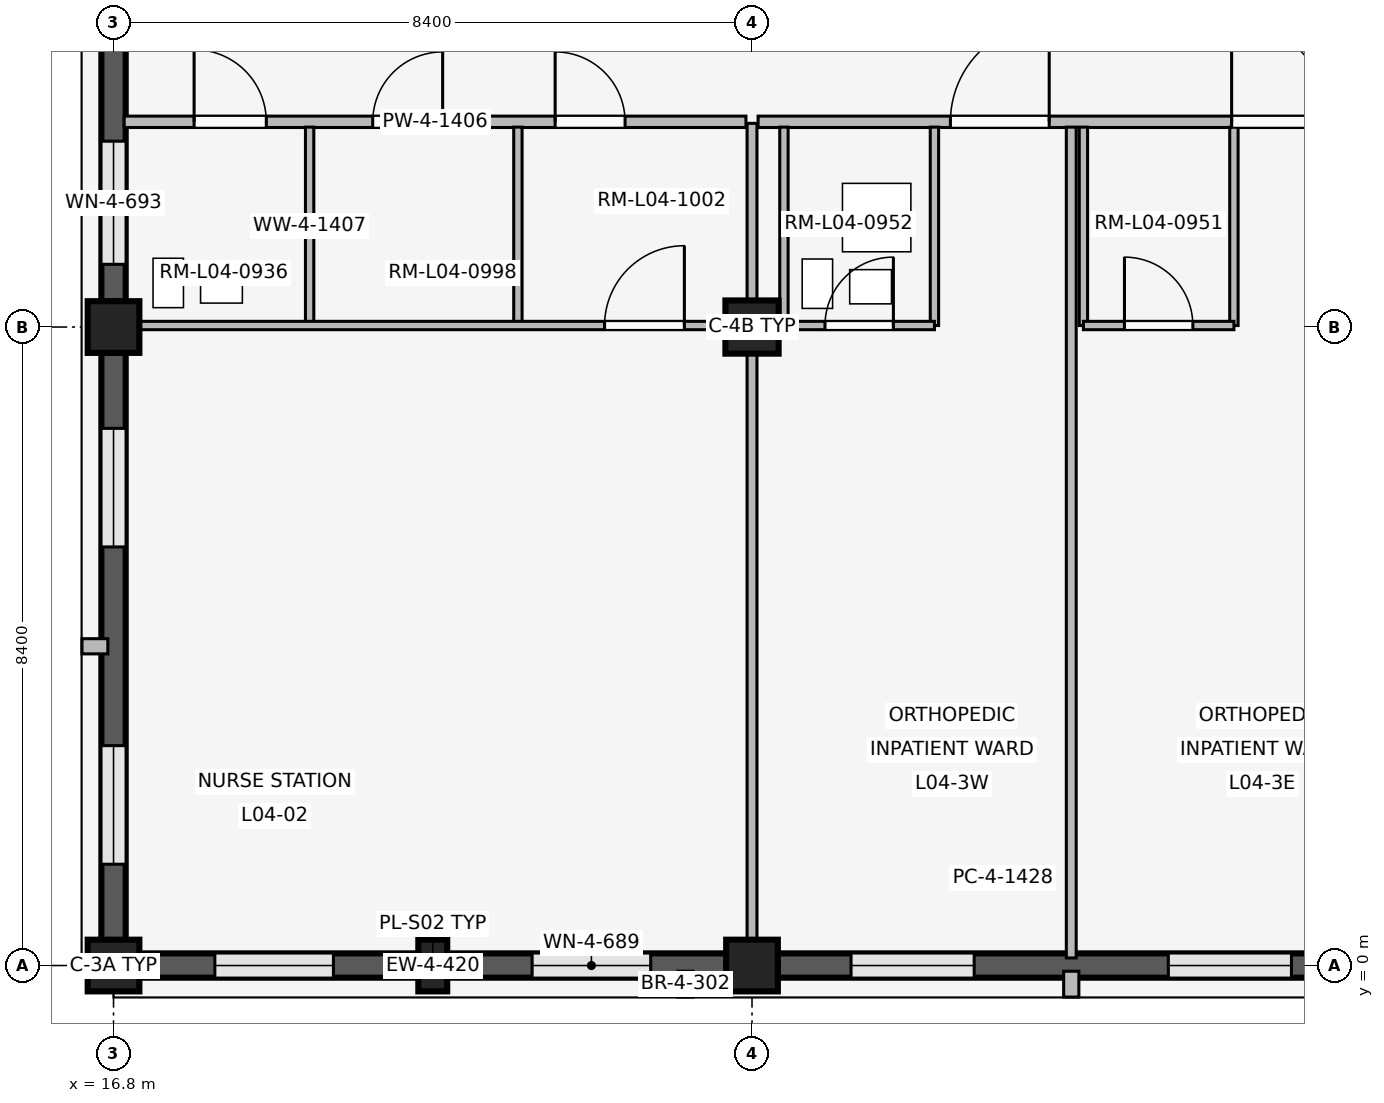
"""IFC4 building model, lengths in metres.
Left out: names, types, materials, properties, quantities, classifications, styles, units other than length and angle.
Written with IfcOpenShell. Run it as: python <this file> out.ifc"""

import sys

from ifc_helpers import new_model, si_unit, direction, frame, frame_2d, origin, origin_2d, place, context, subcontext, project, spatial, rectangle, extrude, element, fill, save


model = new_model("IFC4")
c1 = context("Model", 3, precision=1e-05, world=origin(), true_north=direction((0.0, 1.0)))
c2 = subcontext(c1, "Body", "Model", "MODEL_VIEW")
j1 = project(units=[si_unit("LENGTHUNIT", "METRE"), si_unit("PLANEANGLEUNIT", "RADIAN")], contexts=[c1])
p1 = place(None, origin())
s1 = spatial("IfcSite", under=j1, at=p1, CompositionType="ELEMENT")
p2 = place(p1, origin())
s2 = spatial("IfcBuilding", under=s1, at=p2, CompositionType="ELEMENT")
p3 = place(p2, frame((0.0, 0.0, 16.2)))
s3 = spatial("IfcBuildingStorey", under=s2, at=p3, CompositionType="ELEMENT", Elevation=16.2)
for number, where, z_axis, x_axis in (
    (1, (16.8, 0.0, 0.0), (0.0, 0.0, 1.0), (1.0, 0.0, 0.0)),
    (2, (16.8, 8.4, 0.0), (0.0, 0.0, 1.0), (1.0, 0.0, 0.0)),
    (3, (25.2, 0.0, 0.0), (0.0, 0.0, 1.0), (1.0, 0.0, 0.0)),
):
    element("IfcColumn", number, at=place(p3, frame(where, z_axis=z_axis, x_axis=x_axis)), inside=s3, PredefinedType="COLUMN", context=c2, shape_type="SweptSolid", body=[
        extrude(rectangle(XDim=0.68, YDim=0.68, at=origin_2d()), origin(), (0.0, 0.0, 1.0), 4.2),
    ])
p4 = place(p3, frame((25.2, 8.4, 0.0), z_axis=(0.0, 0.0, 1.0), x_axis=(1.0, 0.0, 0.0)))
e4 = element("IfcColumn", 4, at=p4, inside=s3, PredefinedType="COLUMN", context=c2, shape_type="SweptSolid", body=[
    extrude(rectangle(XDim=0.7, YDim=0.7, at=origin_2d()), origin(), (0.0, 0.0, 1.0), 4.2),
])
p5 = place(p3, frame((21.0, 0.0, 0.0), z_axis=(0.0, 0.0, 1.0), x_axis=(1.0, 0.0, 0.0)))
e5 = element("IfcColumn", 5, at=p5, inside=s3, PredefinedType="PILASTER", context=c2, shape_type="SweptSolid", body=[
    extrude(rectangle(XDim=0.38, YDim=0.68, at=origin_2d()), origin(), (0.0, 0.0, 1.0), 4.2),
])
p6 = place(p3, frame((24.865, 0.0, 0.0), z_axis=(0.0, 0.0, 1.0), x_axis=(-1.0, 0.0, 0.0)))
e6 = element("IfcWall", 6, at=p6, inside=s3, PredefinedType="SOLIDWALL", context=c2, shape_type="SweptSolid", body=[
    extrude(rectangle(XDim=7.73, YDim=0.32, at=frame_2d((3.865, 0.0))), origin(), (0.0, 0.0, 1.0), 3.32),
])
p7 = place(p6, frame((0.998, 0.0, 0.85)))
e7 = element("IfcOpeningElement", 7, at=p7, cuts=e6, PredefinedType="OPENING", context=c2, shape_type="SweptSolid", body=[
    extrude(rectangle(XDim=1.56, YDim=1.7, at=frame_2d((0.78, 0.85))), frame((0.0, 0.17, 0.0), z_axis=(0.0, -1.0, 0.0), x_axis=(1.0, 0.0, 0.0)), (0.0, 0.0, 1.0), 0.34),
])
p8 = place(p6, frame((5.172, 0.0, 0.85)))
e8 = element("IfcOpeningElement", 8, at=p8, cuts=e6, PredefinedType="OPENING", context=c2, shape_type="SweptSolid", body=[
    extrude(rectangle(XDim=1.56, YDim=1.7, at=frame_2d((0.78, 0.85))), frame((0.0, 0.17, 0.0), z_axis=(0.0, -1.0, 0.0), x_axis=(1.0, 0.0, 0.0)), (0.0, 0.0, 1.0), 0.34),
])
p9 = place(p3, frame((24.324, -0.075, 0.0), z_axis=(0.0, 0.0, 1.0), x_axis=(0.0, -1.0, 0.0)))
e9 = element("IfcWall", 9, at=p9, inside=s3, PredefinedType="ELEMENTEDWALL", context=c2, shape_type="SweptSolid", body=[
    extrude(rectangle(XDim=0.34, YDim=0.2, at=frame_2d((0.17, 0.0))), origin(), (0.0, 0.0, 1.0), 3.3),
])
p10 = place(p3, frame((16.8, 0.335, 0.0), z_axis=(0.0, 0.0, 1.0), x_axis=(0.0, 1.0, 0.0)))
e10 = element("IfcWall", 10, at=p10, inside=s3, PredefinedType="SOLIDWALL", context=c2, shape_type="SweptSolid", body=[
    extrude(rectangle(XDim=7.73, YDim=0.32, at=frame_2d((3.865, 0.0))), origin(), (0.0, 0.0, 1.0), 3.32),
])
p11 = place(p10, frame((0.998, 0.0, 0.85)))
e11 = element("IfcOpeningElement", 11, at=p11, cuts=e10, PredefinedType="OPENING", context=c2, shape_type="SweptSolid", body=[
    extrude(rectangle(XDim=1.56, YDim=1.7, at=frame_2d((0.78, 0.85))), frame((0.0, 0.17, 0.0), z_axis=(0.0, -1.0, 0.0), x_axis=(1.0, 0.0, 0.0)), (0.0, 0.0, 1.0), 0.34),
])
p12 = place(p10, frame((5.172, 0.0, 0.85)))
e12 = element("IfcOpeningElement", 12, at=p12, cuts=e10, PredefinedType="OPENING", context=c2, shape_type="SweptSolid", body=[
    extrude(rectangle(XDim=1.56, YDim=1.7, at=frame_2d((0.78, 0.85))), frame((0.0, 0.17, 0.0), z_axis=(0.0, -1.0, 0.0), x_axis=(1.0, 0.0, 0.0)), (0.0, 0.0, 1.0), 0.34),
])
p13 = place(p3, frame((16.725, 4.2, 0.0), z_axis=(0.0, 0.0, 1.0), x_axis=(-1.0, 0.0, 0.0)))
e13 = element("IfcWall", 13, at=p13, inside=s3, PredefinedType="ELEMENTEDWALL", context=c2, shape_type="SweptSolid", body=[
    extrude(rectangle(XDim=0.34, YDim=0.2, at=frame_2d((0.17, 0.0))), origin(), (0.0, 0.0, 1.0), 3.3),
])
p14 = place(p3, frame((16.8, 8.735, 0.0), z_axis=(0.0, 0.0, 1.0), x_axis=(0.0, 1.0, 0.0)))
e14 = element("IfcWall", 14, at=p14, inside=s3, PredefinedType="SOLIDWALL", context=c2, shape_type="SweptSolid", body=[
    extrude(rectangle(XDim=7.73, YDim=0.32, at=frame_2d((3.865, 0.0))), origin(), (0.0, 0.0, 1.0), 3.32),
])
p15 = place(p14, frame((0.49, 0.0, 0.85)))
e15 = element("IfcOpeningElement", 15, at=p15, cuts=e14, PredefinedType="OPENING", context=c2, shape_type="SweptSolid", body=[
    extrude(rectangle(XDim=1.62, YDim=1.8, at=frame_2d((0.81, 0.9))), frame((0.0, 0.17, 0.0), z_axis=(0.0, -1.0, 0.0), x_axis=(1.0, 0.0, 0.0)), (0.0, 0.0, 1.0), 0.34),
])
p16 = place(p14, frame((5.67, 0.0, 0.85)))
e16 = element("IfcOpeningElement", 16, at=p16, cuts=e14, PredefinedType="OPENING", context=c2, shape_type="SweptSolid", body=[
    extrude(rectangle(XDim=1.62, YDim=1.8, at=frame_2d((0.81, 0.9))), frame((0.0, 0.17, 0.0), z_axis=(0.0, -1.0, 0.0), x_axis=(1.0, 0.0, 0.0)), (0.0, 0.0, 1.0), 0.34),
])
p17 = place(p3, frame((33.265, 0.0, 0.0), z_axis=(0.0, 0.0, 1.0), x_axis=(-1.0, 0.0, 0.0)))
e17 = element("IfcWall", 17, at=p17, inside=s3, PredefinedType="SOLIDWALL", context=c2, shape_type="SweptSolid", body=[
    extrude(rectangle(XDim=7.73, YDim=0.32, at=frame_2d((3.865, 0.0))), origin(), (0.0, 0.0, 1.0), 3.32),
])
p18 = place(p17, frame((0.968, 0.0, 0.85)))
e18 = element("IfcOpeningElement", 18, at=p18, cuts=e17, PredefinedType="OPENING", context=c2, shape_type="SweptSolid", body=[
    extrude(rectangle(XDim=1.62, YDim=1.8, at=frame_2d((0.81, 0.9))), frame((0.0, 0.17, 0.0), z_axis=(0.0, -1.0, 0.0), x_axis=(1.0, 0.0, 0.0)), (0.0, 0.0, 1.0), 0.34),
])
p19 = place(p17, frame((5.142, 0.0, 0.85)))
e19 = element("IfcOpeningElement", 19, at=p19, cuts=e17, PredefinedType="OPENING", context=c2, shape_type="SweptSolid", body=[
    extrude(rectangle(XDim=1.62, YDim=1.8, at=frame_2d((0.81, 0.9))), frame((0.0, 0.17, 0.0), z_axis=(0.0, -1.0, 0.0), x_axis=(1.0, 0.0, 0.0)), (0.0, 0.0, 1.0), 0.34),
])
p20 = place(p3, frame((29.4, -0.075, 0.0), z_axis=(0.0, 0.0, 1.0), x_axis=(0.0, -1.0, 0.0)))
e20 = element("IfcWall", 20, at=p20, inside=s3, PredefinedType="ELEMENTEDWALL", context=c2, shape_type="SweptSolid", body=[
    extrude(rectangle(XDim=0.34, YDim=0.2, at=frame_2d((0.17, 0.0))), origin(), (0.0, 0.0, 1.0), 3.3),
])
p21 = place(p3, frame((16.94, 11.1, 0.0), z_axis=(0.0, 0.0, 1.0), x_axis=(1.0, 0.0, 0.0)))
e21 = element("IfcWall", 21, at=p21, inside=s3, PredefinedType="PARTITIONING", context=c2, shape_type="SweptSolid", body=[
    extrude(rectangle(XDim=8.18, YDim=0.15, at=frame_2d((4.09, 0.0))), origin(), (0.0, 0.0, 1.0), 3.3),
])
p22 = place(p21, frame((0.92, 0.0, 0.0)))
e22 = element("IfcOpeningElement", 22, at=p22, cuts=e21, PredefinedType="OPENING", context=c2, shape_type="SweptSolid", body=[
    extrude(rectangle(XDim=0.95, YDim=2.15, at=frame_2d((0.475, 1.075))), frame((0.0, 0.085, 0.0), z_axis=(0.0, -1.0, 0.0), x_axis=(1.0, 0.0, 0.0)), (0.0, 0.0, 1.0), 0.17),
])
p23 = place(p21, frame((3.27, 0.0, 0.0)))
e23 = element("IfcOpeningElement", 23, at=p23, cuts=e21, PredefinedType="OPENING", context=c2, shape_type="SweptSolid", body=[
    extrude(rectangle(XDim=0.92, YDim=2.1, at=frame_2d((0.46, 1.05))), frame((0.0, 0.085, 0.0), z_axis=(0.0, -1.0, 0.0), x_axis=(1.0, 0.0, 0.0)), (0.0, 0.0, 1.0), 0.17),
])
p24 = place(p21, frame((5.67, 0.0, 0.0)))
e24 = element("IfcOpeningElement", 24, at=p24, cuts=e21, PredefinedType="OPENING", context=c2, shape_type="SweptSolid", body=[
    extrude(rectangle(XDim=0.92, YDim=2.1, at=frame_2d((0.46, 1.05))), frame((0.0, 0.085, 0.0), z_axis=(0.0, -1.0, 0.0), x_axis=(1.0, 0.0, 0.0)), (0.0, 0.0, 1.0), 0.17),
])
for number, where, z_axis, x_axis in (
    (25, (19.38, 8.44, 0.0), (0.0, 0.0, 1.0), (0.0, 1.0, 0.0)),
    (26, (22.12, 8.44, 0.0), (0.0, 0.0, 1.0), (0.0, 1.0, 0.0)),
):
    element("IfcWall", number, at=place(p3, frame(where, z_axis=z_axis, x_axis=x_axis)), inside=s3, PredefinedType="PARTITIONING", context=c2, shape_type="SweptSolid", body=[
        extrude(rectangle(XDim=2.59, YDim=0.11, at=frame_2d((1.295, 0.0))), origin(), (0.0, 0.0, 1.0), 3.3),
    ])
p25 = place(p3, frame((16.94, 8.42, 0.0), z_axis=(0.0, 0.0, 1.0), x_axis=(1.0, 0.0, 0.0)))
e27 = element("IfcWall", 27, at=p25, inside=s3, PredefinedType="PARTITIONING", context=c2, shape_type="SweptSolid", body=[
    extrude(rectangle(XDim=8.18, YDim=0.11, at=frame_2d((4.09, 0.0))), origin(), (0.0, 0.0, 1.0), 3.3),
])
p26 = place(p25, frame((6.32, 0.0, 0.0)))
e28 = element("IfcOpeningElement", 28, at=p26, cuts=e27, PredefinedType="OPENING", context=c2, shape_type="SweptSolid", body=[
    extrude(rectangle(XDim=1.05, YDim=2.2, at=frame_2d((0.525, 1.1))), frame((0.0, 0.065, 0.0), z_axis=(0.0, -1.0, 0.0), x_axis=(1.0, 0.0, 0.0)), (0.0, 0.0, 1.0), 0.13),
])
p27 = place(p3, frame((25.2, 0.14, 0.0), z_axis=(0.0, 0.0, 1.0), x_axis=(0.0, 1.0, 0.0)))
e29 = element("IfcWall", 29, at=p27, inside=s3, PredefinedType="PARTITIONING", context=c2, shape_type="SweptSolid", body=[
    extrude(rectangle(XDim=10.94, YDim=0.13, at=frame_2d((5.47, 0.0))), origin(), (0.0, 0.0, 1.0), 3.3),
])
p28 = place(p3, frame((25.28, 11.1, 0.0), z_axis=(0.0, 0.0, 1.0), x_axis=(1.0, 0.0, 0.0)))
e30 = element("IfcWall", 30, at=p28, inside=s3, PredefinedType="PARTITIONING", context=c2, shape_type="SweptSolid", body=[
    extrude(rectangle(XDim=8.24, YDim=0.15, at=frame_2d((4.12, 0.0))), origin(), (0.0, 0.0, 1.0), 3.3),
])
p29 = place(p28, frame((2.53, 0.0, 0.0)))
e31 = element("IfcOpeningElement", 31, at=p29, cuts=e30, PredefinedType="OPENING", context=c2, shape_type="SweptSolid", body=[
    extrude(rectangle(XDim=1.3, YDim=2.25, at=frame_2d((0.65, 1.125))), frame((0.0, 0.085, 0.0), z_axis=(0.0, -1.0, 0.0), x_axis=(1.0, 0.0, 0.0)), (0.0, 0.0, 1.0), 0.17),
])
p30 = place(p28, frame((6.23, 0.0, 0.0)))
e32 = element("IfcOpeningElement", 32, at=p30, cuts=e30, PredefinedType="OPENING", context=c2, shape_type="SweptSolid", body=[
    extrude(rectangle(XDim=1.3, YDim=2.25, at=frame_2d((0.65, 1.125))), frame((0.0, 0.085, 0.0), z_axis=(0.0, -1.0, 0.0), x_axis=(1.0, 0.0, 0.0)), (0.0, 0.0, 1.0), 0.17),
])
p31 = place(p3, frame((29.4, 0.1, 0.0), z_axis=(0.0, 0.0, 1.0), x_axis=(0.0, 1.0, 0.0)))
e33 = element("IfcWall", 33, at=p31, inside=s3, PredefinedType="PARTITIONING", context=c2, shape_type="SweptSolid", body=[
    extrude(rectangle(XDim=10.93, YDim=0.13, at=frame_2d((5.465, 0.0))), origin(), (0.0, 0.0, 1.0), 3.3),
])
for number, where, z_axis, x_axis in (
    (34, (25.62, 8.42, 0.0), (0.0, 0.0, 1.0), (0.0, 1.0, 0.0)),
    (35, (27.6, 8.42, 0.0), (0.0, 0.0, 1.0), (0.0, 1.0, 0.0)),
):
    element("IfcWall", number, at=place(p3, frame(where, z_axis=z_axis, x_axis=x_axis)), inside=s3, PredefinedType="PARTITIONING", context=c2, shape_type="SweptSolid", body=[
        extrude(rectangle(XDim=2.61, YDim=0.11, at=frame_2d((1.305, 0.0))), origin(), (0.0, 0.0, 1.0), 3.3),
    ])
p32 = place(p3, frame((25.62, 8.42, 0.0), z_axis=(0.0, 0.0, 1.0), x_axis=(1.0, 0.0, 0.0)))
e36 = element("IfcWall", 36, at=p32, inside=s3, PredefinedType="PARTITIONING", context=c2, shape_type="SweptSolid", body=[
    extrude(rectangle(XDim=1.98, YDim=0.11, at=frame_2d((0.99, 0.0))), origin(), (0.0, 0.0, 1.0), 3.3),
])
p33 = place(p32, frame((0.54, 0.0, 0.0)))
e37 = element("IfcOpeningElement", 37, at=p33, cuts=e36, PredefinedType="OPENING", context=c2, shape_type="SweptSolid", body=[
    extrude(rectangle(XDim=0.9, YDim=2.1, at=frame_2d((0.45, 1.05))), frame((0.0, 0.065, 0.0), z_axis=(0.0, -1.0, 0.0), x_axis=(1.0, 0.0, 0.0)), (0.0, 0.0, 1.0), 0.13),
])
for number, where, z_axis, x_axis in (
    (38, (29.56, 8.42, 0.0), (0.0, 0.0, 1.0), (0.0, 1.0, 0.0)),
    (39, (31.54, 8.42, 0.0), (0.0, 0.0, 1.0), (0.0, 1.0, 0.0)),
):
    element("IfcWall", number, at=place(p3, frame(where, z_axis=z_axis, x_axis=x_axis)), inside=s3, PredefinedType="PARTITIONING", context=c2, shape_type="SweptSolid", body=[
        extrude(rectangle(XDim=2.61, YDim=0.11, at=frame_2d((1.305, 0.0))), origin(), (0.0, 0.0, 1.0), 3.3),
    ])
p34 = place(p3, frame((29.56, 8.42, 0.0), z_axis=(0.0, 0.0, 1.0), x_axis=(1.0, 0.0, 0.0)))
e40 = element("IfcWall", 40, at=p34, inside=s3, PredefinedType="PARTITIONING", context=c2, shape_type="SweptSolid", body=[
    extrude(rectangle(XDim=1.98, YDim=0.11, at=frame_2d((0.99, 0.0))), origin(), (0.0, 0.0, 1.0), 3.3),
])
p35 = place(p34, frame((0.54, 0.0, 0.0)))
e41 = element("IfcOpeningElement", 41, at=p35, cuts=e40, PredefinedType="OPENING", context=c2, shape_type="SweptSolid", body=[
    extrude(rectangle(XDim=0.9, YDim=2.1, at=frame_2d((0.45, 1.05))), frame((0.0, 0.065, 0.0), z_axis=(0.0, -1.0, 0.0), x_axis=(1.0, 0.0, 0.0)), (0.0, 0.0, 1.0), 0.13),
])
p36 = place(p3, frame((28.05, 1.15, 0.0), z_axis=(0.0, 0.0, 1.0), x_axis=(1.0, 0.0, 0.0)))
e42 = element("IfcWall", 42, at=p36, inside=s3, PredefinedType="PLUMBINGWALL", context=c2, shape_type="SweptSolid", body=[
    extrude(rectangle(XDim=0.9, YDim=0.24, at=frame_2d((0.45, 0.0))), origin(), (0.0, 0.0, 1.0), 3.3),
])
p37 = place(p7, origin())
e43 = element("IfcWindow", 43, at=p37, inside=s3, PartitioningType="SINGLE_PANEL", PredefinedType="WINDOW", context=c2, shape_type="SweptSolid", body=[
    extrude(rectangle(XDim=1.56, YDim=1.7, at=frame_2d((0.78, 0.85))), frame((0.0, 0.03, 0.0), z_axis=(0.0, -1.0, 0.0), x_axis=(1.0, 0.0, 0.0)), (0.0, 0.0, 1.0), 0.06),
])
fill(e7, e43)
p38 = place(p8, origin())
e44 = element("IfcWindow", 44, at=p38, inside=s3, PartitioningType="SINGLE_PANEL", PredefinedType="WINDOW", context=c2, shape_type="SweptSolid", body=[
    extrude(rectangle(XDim=1.56, YDim=1.7, at=frame_2d((0.78, 0.85))), frame((0.0, 0.03, 0.0), z_axis=(0.0, -1.0, 0.0), x_axis=(1.0, 0.0, 0.0)), (0.0, 0.0, 1.0), 0.06),
])
fill(e8, e44)
p39 = place(p11, origin())
e45 = element("IfcWindow", 45, at=p39, inside=s3, PartitioningType="SINGLE_PANEL", PredefinedType="WINDOW", context=c2, shape_type="SweptSolid", body=[
    extrude(rectangle(XDim=1.56, YDim=1.7, at=frame_2d((0.78, 0.85))), frame((0.0, 0.03, 0.0), z_axis=(0.0, -1.0, 0.0), x_axis=(1.0, 0.0, 0.0)), (0.0, 0.0, 1.0), 0.06),
])
fill(e11, e45)
p40 = place(p12, origin())
e46 = element("IfcWindow", 46, at=p40, inside=s3, PartitioningType="SINGLE_PANEL", PredefinedType="WINDOW", context=c2, shape_type="SweptSolid", body=[
    extrude(rectangle(XDim=1.56, YDim=1.7, at=frame_2d((0.78, 0.85))), frame((0.0, 0.03, 0.0), z_axis=(0.0, -1.0, 0.0), x_axis=(1.0, 0.0, 0.0)), (0.0, 0.0, 1.0), 0.06),
])
fill(e12, e46)
p41 = place(p15, origin())
e47 = element("IfcWindow", 47, at=p41, inside=s3, PartitioningType="SINGLE_PANEL", PredefinedType="WINDOW", context=c2, shape_type="SweptSolid", body=[
    extrude(rectangle(XDim=1.62, YDim=1.8, at=frame_2d((0.81, 0.9))), frame((0.0, 0.03, 0.0), z_axis=(0.0, -1.0, 0.0), x_axis=(1.0, 0.0, 0.0)), (0.0, 0.0, 1.0), 0.06),
])
fill(e15, e47)
p42 = place(p18, origin())
e48 = element("IfcWindow", 48, at=p42, inside=s3, PartitioningType="SINGLE_PANEL", PredefinedType="WINDOW", context=c2, shape_type="SweptSolid", body=[
    extrude(rectangle(XDim=1.62, YDim=1.8, at=frame_2d((0.81, 0.9))), frame((0.0, 0.03, 0.0), z_axis=(0.0, -1.0, 0.0), x_axis=(1.0, 0.0, 0.0)), (0.0, 0.0, 1.0), 0.06),
])
fill(e18, e48)
p43 = place(p19, origin())
e49 = element("IfcWindow", 49, at=p43, inside=s3, PartitioningType="SINGLE_PANEL", PredefinedType="WINDOW", context=c2, shape_type="SweptSolid", body=[
    extrude(rectangle(XDim=1.62, YDim=1.8, at=frame_2d((0.81, 0.9))), frame((0.0, 0.03, 0.0), z_axis=(0.0, -1.0, 0.0), x_axis=(1.0, 0.0, 0.0)), (0.0, 0.0, 1.0), 0.06),
])
fill(e19, e49)
p44 = place(p22, origin())
e50 = element("IfcDoor", 50, at=p44, inside=s3, OperationType="SINGLE_SWING_LEFT", PredefinedType="DOOR", context=c2, shape_type="SweptSolid", body=[
    extrude(rectangle(XDim=0.95, YDim=2.15, at=frame_2d((0.475, 1.075))), frame((0.0, 0.025, 0.0), z_axis=(0.0, -1.0, 0.0), x_axis=(1.0, 0.0, 0.0)), (0.0, 0.0, 1.0), 0.05),
])
fill(e22, e50)
p45 = place(p23, origin())
e51 = element("IfcDoor", 51, at=p45, inside=s3, OperationType="SINGLE_SWING_RIGHT", PredefinedType="DOOR", context=c2, shape_type="SweptSolid", body=[
    extrude(rectangle(XDim=0.92, YDim=2.1, at=frame_2d((0.46, 1.05))), frame((0.0, 0.025, 0.0), z_axis=(0.0, -1.0, 0.0), x_axis=(1.0, 0.0, 0.0)), (0.0, 0.0, 1.0), 0.05),
])
fill(e23, e51)
p46 = place(p24, origin())
e52 = element("IfcDoor", 52, at=p46, inside=s3, OperationType="SINGLE_SWING_LEFT", PredefinedType="DOOR", context=c2, shape_type="SweptSolid", body=[
    extrude(rectangle(XDim=0.92, YDim=2.1, at=frame_2d((0.46, 1.05))), frame((0.0, 0.025, 0.0), z_axis=(0.0, -1.0, 0.0), x_axis=(1.0, 0.0, 0.0)), (0.0, 0.0, 1.0), 0.05),
])
fill(e24, e52)
p47 = place(p26, origin())
e53 = element("IfcDoor", 53, at=p47, inside=s3, OperationType="SINGLE_SWING_RIGHT", PredefinedType="DOOR", context=c2, shape_type="SweptSolid", body=[
    extrude(rectangle(XDim=1.05, YDim=2.2, at=frame_2d((0.525, 1.1))), frame((0.0, 0.025, 0.0), z_axis=(0.0, -1.0, 0.0), x_axis=(1.0, 0.0, 0.0)), (0.0, 0.0, 1.0), 0.05),
])
fill(e28, e53)
p48 = place(p29, origin())
e54 = element("IfcDoor", 54, at=p48, inside=s3, OperationType="SINGLE_SWING_RIGHT", PredefinedType="DOOR", context=c2, shape_type="SweptSolid", body=[
    extrude(rectangle(XDim=1.3, YDim=2.25, at=frame_2d((0.65, 1.125))), frame((0.0, 0.025, 0.0), z_axis=(0.0, -1.0, 0.0), x_axis=(1.0, 0.0, 0.0)), (0.0, 0.0, 1.0), 0.05),
])
fill(e31, e54)
p49 = place(p30, origin())
e55 = element("IfcDoor", 55, at=p49, inside=s3, OperationType="SINGLE_SWING_LEFT", PredefinedType="DOOR", context=c2, shape_type="SweptSolid", body=[
    extrude(rectangle(XDim=1.3, YDim=2.25, at=frame_2d((0.65, 1.125))), frame((0.0, 0.025, 0.0), z_axis=(0.0, -1.0, 0.0), x_axis=(1.0, 0.0, 0.0)), (0.0, 0.0, 1.0), 0.05),
])
fill(e32, e55)
p50 = place(p33, origin())
e56 = element("IfcDoor", 56, at=p50, inside=s3, OperationType="SINGLE_SWING_RIGHT", PredefinedType="DOOR", context=c2, shape_type="SweptSolid", body=[
    extrude(rectangle(XDim=0.9, YDim=2.1, at=frame_2d((0.45, 1.05))), frame((0.0, 0.025, 0.0), z_axis=(0.0, -1.0, 0.0), x_axis=(1.0, 0.0, 0.0)), (0.0, 0.0, 1.0), 0.05),
])
fill(e37, e56)
p51 = place(p35, origin())
e57 = element("IfcDoor", 57, at=p51, inside=s3, OperationType="SINGLE_SWING_LEFT", PredefinedType="DOOR", context=c2, shape_type="SweptSolid", body=[
    extrude(rectangle(XDim=0.9, YDim=2.1, at=frame_2d((0.45, 1.05))), frame((0.0, 0.025, 0.0), z_axis=(0.0, -1.0, 0.0), x_axis=(1.0, 0.0, 0.0)), (0.0, 0.0, 1.0), 0.05),
])
fill(e41, e57)
save(model, sys.argv[1])
